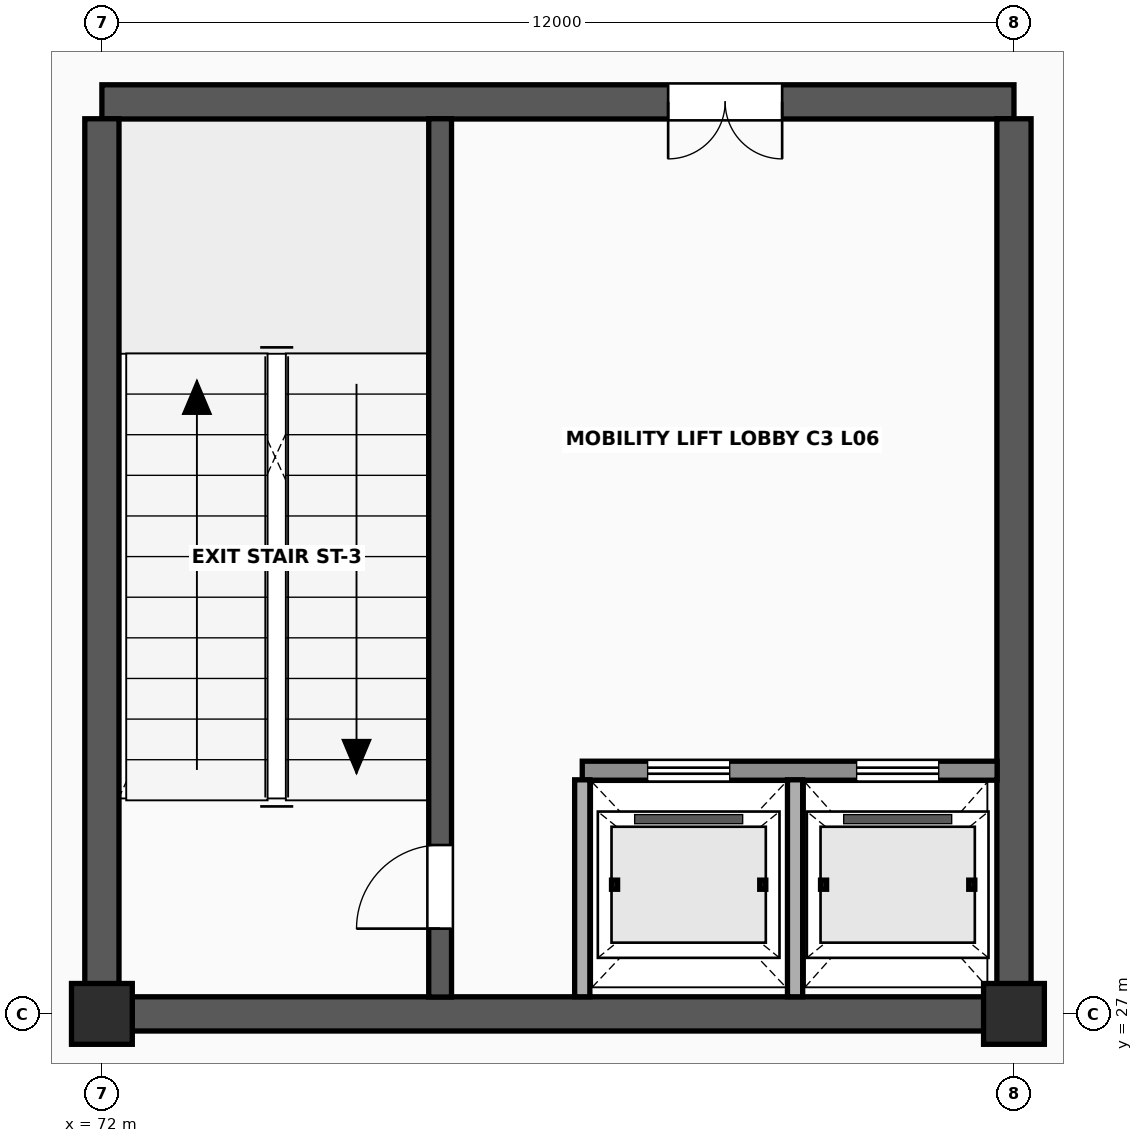
"""IFC4 building model, lengths in metres.
Left out: names, types, materials, properties, quantities, classifications, styles, units other than length and angle.
Written with IfcOpenShell. Run it as: python <this file> out.ifc"""

import sys

from ifc_helpers import new_model, si_unit, direction, frame, frame_2d, origin, origin_2d, place, context, subcontext, project, spatial, rectangle, extrude, element, fill, save


model = new_model("IFC4")
c1 = context("Model", 3, precision=1e-05, world=origin(), true_north=direction((0.0, 1.0)))
c2 = subcontext(c1, "Body", "Model", "MODEL_VIEW")
j1 = project(units=[si_unit("LENGTHUNIT", "METRE"), si_unit("PLANEANGLEUNIT", "RADIAN")], contexts=[c1])
p1 = place(None, origin())
s1 = spatial("IfcSite", under=j1, at=p1, CompositionType="ELEMENT")
p2 = place(p1, origin())
s2 = spatial("IfcBuilding", under=s1, at=p2, CompositionType="ELEMENT")
p3 = place(p2, frame((0.0, 0.0, 24.8)))
s3 = spatial("IfcBuildingStorey", under=s2, at=p3, CompositionType="ELEMENT", Elevation=24.8)
for number, where, z_axis, x_axis in (
    (1, (72.0, 27.0, 0.0), (0.0, 0.0, 1.0), (1.0, 0.0, 0.0)),
    (2, (84.0, 27.0, 0.0), (0.0, 0.0, 1.0), (1.0, 0.0, 0.0)),
):
    element("IfcColumn", number, at=place(p3, frame(where, z_axis=z_axis, x_axis=x_axis)), inside=s3, PredefinedType="COLUMN", context=c2, shape_type="SweptSolid", body=[
        extrude(rectangle(XDim=0.8, YDim=0.8, at=origin_2d()), origin(), (0.0, 0.0, 1.0), 3.8),
    ])
p4 = place(p3, frame((72.397, 27.0, 0.0), z_axis=(0.0, 0.0, 1.0), x_axis=(1.0, 0.0, 0.0)))
e3 = element("IfcWall", 3, at=p4, inside=s3, PredefinedType="SHEAR", context=c2, shape_type="SweptSolid", body=[
    extrude(rectangle(XDim=11.206, YDim=0.45, at=frame_2d((5.603, 0.0))), origin(), (0.0, 0.0, 1.0), 3.628),
])
p5 = place(p3, frame((72.0, 39.0, 0.0), z_axis=(0.0, 0.0, 1.0), x_axis=(1.0, 0.0, 0.0)))
e4 = element("IfcWall", 4, at=p5, inside=s3, PredefinedType="SHEAR", context=c2, shape_type="SweptSolid", body=[
    extrude(rectangle(XDim=12.0, YDim=0.45, at=frame_2d((6.0, 0.0))), origin(), (0.0, 0.0, 1.0), 3.628),
])
p6 = place(p5, frame((7.45, 0.0, 0.0)))
e5 = element("IfcOpeningElement", 5, at=p6, cuts=e4, PredefinedType="OPENING", context=c2, shape_type="SweptSolid", body=[
    extrude(rectangle(XDim=1.5, YDim=2.25, at=frame_2d((0.75, 1.125))), frame((0.0, 0.24, 0.0), z_axis=(0.0, -1.0, 0.0), x_axis=(1.0, 0.0, 0.0)), (0.0, 0.0, 1.0), 0.48),
])
for number, where, z_axis, x_axis in (
    (6, (72.0, 27.397, 0.0), (0.0, 0.0, 1.0), (0.0, 1.0, 0.0)),
    (7, (84.0, 27.397, 0.0), (0.0, 0.0, 1.0), (0.0, 1.0, 0.0)),
):
    element("IfcWall", number, at=place(p3, frame(where, z_axis=z_axis, x_axis=x_axis)), inside=s3, PredefinedType="SHEAR", context=c2, shape_type="SweptSolid", body=[
        extrude(rectangle(XDim=11.381, YDim=0.45, at=frame_2d((5.69, 0.0))), origin(), (0.0, 0.0, 1.0), 3.628),
    ])
p7 = place(p3, frame((76.45, 27.222, 0.0), z_axis=(0.0, 0.0, 1.0), x_axis=(0.0, 1.0, 0.0)))
e8 = element("IfcWall", 8, at=p7, inside=s3, PredefinedType="SHEAR", context=c2, shape_type="SweptSolid", body=[
    extrude(rectangle(XDim=11.556, YDim=0.3, at=frame_2d((5.778, 0.0))), origin(), (0.0, 0.0, 1.0), 3.628),
])
p8 = place(p7, frame((0.9, 0.0, 0.0)))
e9 = element("IfcOpeningElement", 9, at=p8, cuts=e8, PredefinedType="OPENING", context=c2, shape_type="SweptSolid", body=[
    extrude(rectangle(XDim=1.1, YDim=2.2, at=frame_2d((0.55, 1.1))), frame((0.0, 0.165, 0.0), z_axis=(0.0, -1.0, 0.0), x_axis=(1.0, 0.0, 0.0)), (0.0, 0.0, 1.0), 0.33),
])
p9 = place(p3, frame((78.32, 30.2, 0.0), z_axis=(0.0, 0.0, 1.0), x_axis=(1.0, 0.0, 0.0)))
e10 = element("IfcWall", 10, at=p9, inside=s3, PredefinedType="SOLIDWALL", context=c2, shape_type="SweptSolid", body=[
    extrude(rectangle(XDim=5.458, YDim=0.25, at=frame_2d((2.729, 0.0))), origin(), (0.0, 0.0, 1.0), 3.628),
])
p10 = place(p9, frame((0.86, 0.0, 0.0)))
e11 = element("IfcOpeningElement", 11, at=p10, cuts=e10, PredefinedType="OPENING", context=c2, shape_type="SweptSolid", body=[
    extrude(rectangle(XDim=1.08, YDim=2.22, at=frame_2d((0.54, 1.11))), frame((0.0, 0.14, 0.0), z_axis=(0.0, -1.0, 0.0), x_axis=(1.0, 0.0, 0.0)), (0.0, 0.0, 1.0), 0.28),
])
p11 = place(p9, frame((3.61, 0.0, 0.0)))
e12 = element("IfcOpeningElement", 12, at=p11, cuts=e10, PredefinedType="OPENING", context=c2, shape_type="SweptSolid", body=[
    extrude(rectangle(XDim=1.08, YDim=2.22, at=frame_2d((0.54, 1.11))), frame((0.0, 0.14, 0.0), z_axis=(0.0, -1.0, 0.0), x_axis=(1.0, 0.0, 0.0)), (0.0, 0.0, 1.0), 0.28),
])
for number, where, z_axis, x_axis in (
    (13, (78.32, 27.225, 0.0), (0.0, 0.0, 1.0), (0.0, 1.0, 0.0)),
    (14, (81.12, 27.225, 0.0), (0.0, 0.0, 1.0), (0.0, 1.0, 0.0)),
):
    element("IfcWall", number, at=place(p3, frame(where, z_axis=z_axis, x_axis=x_axis)), inside=s3, PredefinedType="SOLIDWALL", context=c2, shape_type="SweptSolid", body=[
        extrude(rectangle(XDim=2.855, YDim=0.2, at=frame_2d((1.427, 0.0))), origin(), (0.0, 0.0, 1.0), 3.618),
    ])
p12 = place(p8, origin())
e15 = element("IfcDoor", 15, at=p12, inside=s3, OperationType="SINGLE_SWING_LEFT", PredefinedType="DOOR", context=c2, shape_type="SweptSolid", body=[
    extrude(rectangle(XDim=1.1, YDim=2.2, at=frame_2d((0.55, 1.1))), frame((0.0, 0.025, 0.0), z_axis=(0.0, -1.0, 0.0), x_axis=(1.0, 0.0, 0.0)), (0.0, 0.0, 1.0), 0.05),
])
fill(e9, e15)
p13 = place(p6, origin())
e16 = element("IfcDoor", 16, at=p13, inside=s3, OperationType="DOUBLE_DOOR_SINGLE_SWING", PredefinedType="DOOR", context=c2, shape_type="SweptSolid", body=[
    extrude(rectangle(XDim=1.5, YDim=2.25, at=frame_2d((0.75, 1.125))), frame((0.0, 0.025, 0.0), z_axis=(0.0, -1.0, 0.0), x_axis=(1.0, 0.0, 0.0)), (0.0, 0.0, 1.0), 0.05),
])
fill(e5, e16)
p14 = place(p10, origin())
e17 = element("IfcDoor", 17, at=p14, inside=s3, OperationType="SLIDING_TO_LEFT", PredefinedType="USERDEFINED", context=c2, shape_type="SweptSolid", body=[
    extrude(rectangle(XDim=1.08, YDim=2.22, at=frame_2d((0.54, 1.11))), frame((0.0, 0.025, 0.0), z_axis=(0.0, -1.0, 0.0), x_axis=(1.0, 0.0, 0.0)), (0.0, 0.0, 1.0), 0.05),
])
fill(e11, e17)
p15 = place(p11, origin())
e18 = element("IfcDoor", 18, at=p15, inside=s3, OperationType="SLIDING_TO_LEFT", PredefinedType="USERDEFINED", context=c2, shape_type="SweptSolid", body=[
    extrude(rectangle(XDim=1.08, YDim=2.22, at=frame_2d((0.54, 1.11))), frame((0.0, 0.025, 0.0), z_axis=(0.0, -1.0, 0.0), x_axis=(1.0, 0.0, 0.0)), (0.0, 0.0, 1.0), 0.05),
])
fill(e12, e18)
save(model, sys.argv[1])
